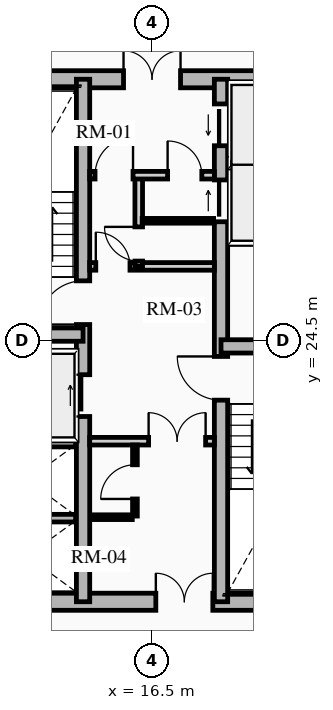
"""IFC4 building model, lengths in metres.
Left out: names, types, materials, properties, quantities, classifications, styles, units other than length and angle.
Written with IfcOpenShell. Run it as: python <this file> out.ifc"""

import sys

from ifc_helpers import new_model, si_unit, direction, frame, frame_2d, origin, place, context, subcontext, project, spatial, rectangle, extrude, source, transform, mapped, element, fill, save


model = new_model("IFC4")
c1 = context("Model", 3, precision=1e-05, world=origin(), true_north=direction((0.0, 1.0)))
c2 = subcontext(c1, "Body", "Model", "MODEL_VIEW")
j1 = project(units=[si_unit("LENGTHUNIT", "METRE"), si_unit("PLANEANGLEUNIT", "RADIAN")], contexts=[c1])
p1 = place(None, origin())
s1 = spatial("IfcSite", under=j1, at=p1, CompositionType="ELEMENT")
p2 = place(p1, origin())
s2 = spatial("IfcBuilding", under=s1, at=p2, CompositionType="ELEMENT")
p3 = place(p2, frame((0.0, 0.0, 75.97)))
s3 = spatial("IfcBuildingStorey", under=s2, at=p3, CompositionType="ELEMENT", Elevation=75.97)
p4 = place(p3, frame((11.15, 17.625, 0.0), z_axis=(0.0, 0.0, 1.0), x_axis=(1.0, 0.0, 0.0)))
e1 = element("IfcWall", 1, at=p4, inside=s3, PredefinedType="SHEAR", context=c2, shape_type="SweptSolid", body=[
    extrude(rectangle(XDim=10.7, YDim=0.45, at=frame_2d((5.35, 0.0))), origin(), (0.0, 0.0, 1.0), 2.91),
])
m1 = source(origin(), c2, "Body", "SweptSolid", [
    extrude(rectangle(XDim=1.5, YDim=2.02, at=frame_2d((0.75, 1.01))), frame((0.0, 0.235, 0.0), z_axis=(0.0, -1.0, 0.0), x_axis=(1.0, 0.0, 0.0)), (0.0, 0.0, 1.0), 0.47),
])
p5 = place(p4, frame((5.45, 0.0, 0.0)))
e2 = element("IfcOpeningElement", 2, at=p5, cuts=e1, PredefinedType="OPENING", context=c2, shape_type="MappedRepresentation", body=[
    mapped(m1, transform((0.0, 0.0, 0.0), x_axis=(1.0, 0.0, 0.0), y_axis=(0.0, 1.0, 0.0), z_axis=(0.0, 0.0, 1.0), scale=1.0)),
])
p6 = place(p3, frame((11.15, 31.375, 0.0), z_axis=(0.0, 0.0, 1.0), x_axis=(1.0, 0.0, 0.0)))
e3 = element("IfcWall", 3, at=p6, inside=s3, PredefinedType="SHEAR", context=c2, shape_type="SweptSolid", body=[
    extrude(rectangle(XDim=10.7, YDim=0.45, at=frame_2d((5.35, 0.0))), origin(), (0.0, 0.0, 1.0), 2.91),
])
p7 = place(p6, frame((4.6, 0.0, 0.0)))
e4 = element("IfcOpeningElement", 4, at=p7, cuts=e3, PredefinedType="OPENING", context=c2, shape_type="MappedRepresentation", body=[
    mapped(m1, transform((0.0, 0.0, 0.0), x_axis=(1.0, 0.0, 0.0), y_axis=(0.0, 1.0, 0.0), z_axis=(0.0, 0.0, 1.0), scale=1.0)),
])
p8 = place(p3, frame((14.685, 17.625, 0.0), z_axis=(0.0, 0.0, 1.0), x_axis=(0.0, 1.0, 0.0)))
e5 = element("IfcWall", 5, at=p8, inside=s3, PredefinedType="SHEAR", context=c2, shape_type="SweptSolid", body=[
    extrude(rectangle(XDim=13.75, YDim=0.35, at=frame_2d((6.875, 0.0))), origin(), (0.0, 0.0, 1.0), 2.91),
])
m2 = source(origin(), c2, "Body", "SweptSolid", [
    extrude(rectangle(XDim=1.1, YDim=2.015, at=frame_2d((0.55, 1.007))), frame((0.0, 0.185, 0.0), z_axis=(0.0, -1.0, 0.0), x_axis=(1.0, 0.0, 0.0)), (0.0, 0.0, 1.0), 0.37),
])
p9 = place(p8, frame((4.875, 0.0, 0.0)))
e6 = element("IfcOpeningElement", 6, at=p9, cuts=e5, PredefinedType="OPENING", context=c2, shape_type="MappedRepresentation", body=[
    mapped(m2, transform((0.0, 0.0, 0.0), x_axis=(1.0, 0.0, 0.0), y_axis=(0.0, 1.0, 0.0), z_axis=(0.0, 0.0, 1.0), scale=1.0)),
])
m3 = source(origin(), c2, "Body", "SweptSolid", [
    extrude(rectangle(XDim=1.15, YDim=2.02, at=frame_2d((0.575, 1.01))), frame((0.0, 0.185, 0.0), z_axis=(0.0, -1.0, 0.0), x_axis=(1.0, 0.0, 0.0)), (0.0, 0.0, 1.0), 0.37),
])
p10 = place(p8, frame((7.295, 0.0, 0.0)))
e7 = element("IfcOpeningElement", 7, at=p10, cuts=e5, PredefinedType="OPENING", context=c2, shape_type="MappedRepresentation", body=[
    mapped(m3, transform((0.0, 0.0, 0.0), x_axis=(1.0, 0.0, 0.0), y_axis=(0.0, 1.0, 0.0), z_axis=(0.0, 0.0, 1.0), scale=1.0)),
])
p11 = place(p3, frame((18.315, 17.625, 0.0), z_axis=(0.0, 0.0, 1.0), x_axis=(0.0, 1.0, 0.0)))
e8 = element("IfcWall", 8, at=p11, inside=s3, PredefinedType="SHEAR", context=c2, shape_type="SweptSolid", body=[
    extrude(rectangle(XDim=13.75, YDim=0.35, at=frame_2d((6.875, 0.0))), origin(), (0.0, 0.0, 1.0), 2.91),
])
p12 = place(p11, frame((10.0, 0.0, 0.0)))
e9 = element("IfcOpeningElement", 9, at=p12, cuts=e8, PredefinedType="OPENING", context=c2, shape_type="MappedRepresentation", body=[
    mapped(m2, transform((0.0, 0.0, 0.0), x_axis=(1.0, 0.0, 0.0), y_axis=(0.0, 1.0, 0.0), z_axis=(0.0, 0.0, 1.0), scale=1.0)),
])
p13 = place(p11, frame((12.0, 0.0, 0.0)))
e10 = element("IfcOpeningElement", 10, at=p13, cuts=e8, PredefinedType="OPENING", context=c2, shape_type="MappedRepresentation", body=[
    mapped(m2, transform((0.0, 0.0, 0.0), x_axis=(1.0, 0.0, 0.0), y_axis=(0.0, 1.0, 0.0), z_axis=(0.0, 0.0, 1.0), scale=1.0)),
])
p14 = place(p11, frame((5.305, 0.0, 0.0)))
e11 = element("IfcOpeningElement", 11, at=p14, cuts=e8, PredefinedType="OPENING", context=c2, shape_type="MappedRepresentation", body=[
    mapped(m3, transform((0.0, 0.0, 0.0), x_axis=(1.0, 0.0, 0.0), y_axis=(0.0, 1.0, 0.0), z_axis=(0.0, 0.0, 1.0), scale=1.0)),
])
for number, where, z_axis, x_axis in (
    (12, (11.4, 24.655, 0.0), (0.0, 0.0, 1.0), (1.0, 0.0, 0.0)),
    (13, (18.315, 24.345, 0.0), (0.0, 0.0, 1.0), (1.0, 0.0, 0.0)),
):
    element("IfcWall", number, at=place(p3, frame(where, z_axis=z_axis, x_axis=x_axis)), inside=s3, PredefinedType="SHEAR", context=c2, shape_type="SweptSolid", body=[
        extrude(rectangle(XDim=3.285, YDim=0.35, at=frame_2d((1.643, 0.0))), origin(), (0.0, 0.0, 1.0), 2.91),
    ])
for number, where, z_axis, x_axis in (
    (14, (11.52, 21.8, 0.0), (0.0, 0.0, 1.0), (1.0, 0.0, 0.0)),
    (15, (11.52, 19.825, 0.0), (0.0, 0.0, 1.0), (1.0, 0.0, 0.0)),
    (16, (18.51, 27.13, 0.0), (0.0, 0.0, 1.0), (1.0, 0.0, 0.0)),
    (17, (18.51, 29.175, 0.0), (0.0, 0.0, 1.0), (1.0, 0.0, 0.0)),
):
    element("IfcWall", number, at=place(p3, frame(where, z_axis=z_axis, x_axis=x_axis)), inside=s3, PredefinedType="SHEAR", context=c2, shape_type="SweptSolid", body=[
        extrude(rectangle(XDim=2.97, YDim=0.2, at=frame_2d((1.485, 0.0))), origin(), (0.0, 0.0, 1.0), 2.91),
    ])
p15 = place(p3, frame((14.86, 21.85, 0.0), z_axis=(0.0, 0.0, 1.0), x_axis=(1.0, 0.0, 0.0)))
e18 = element("IfcWall", 18, at=p15, inside=s3, PredefinedType="PARTITIONING", context=c2, shape_type="SweptSolid", body=[
    extrude(rectangle(XDim=3.28, YDim=0.2, at=frame_2d((1.64, 0.0))), origin(), (0.0, 0.0, 1.0), 2.655),
])
m4 = source(origin(), c2, "Body", "SweptSolid", [
    extrude(rectangle(XDim=1.5, YDim=2.02, at=frame_2d((0.75, 1.01))), frame((0.0, 0.11, 0.0), z_axis=(0.0, -1.0, 0.0), x_axis=(1.0, 0.0, 0.0)), (0.0, 0.0, 1.0), 0.22),
])
p16 = place(p15, frame((1.55, 0.0, 0.0)))
e19 = element("IfcOpeningElement", 19, at=p16, cuts=e18, PredefinedType="OPENING", context=c2, shape_type="MappedRepresentation", body=[
    mapped(m4, transform((0.0, 0.0, 0.0), x_axis=(1.0, 0.0, 0.0), y_axis=(0.0, 1.0, 0.0), z_axis=(0.0, 0.0, 1.0), scale=1.0)),
])
p17 = place(p3, frame((14.86, 26.45, 0.0), z_axis=(0.0, 0.0, 1.0), x_axis=(1.0, 0.0, 0.0)))
e20 = element("IfcWall", 20, at=p17, inside=s3, PredefinedType="PARTITIONING", context=c2, shape_type="SweptSolid", body=[
    extrude(rectangle(XDim=3.28, YDim=0.2, at=frame_2d((1.64, 0.0))), origin(), (0.0, 0.0, 1.0), 2.655),
])
m5 = source(origin(), c2, "Body", "SweptSolid", [
    extrude(rectangle(XDim=0.9, YDim=2.005, at=frame_2d((0.45, 1.002))), frame((0.0, 0.11, 0.0), z_axis=(0.0, -1.0, 0.0), x_axis=(1.0, 0.0, 0.0)), (0.0, 0.0, 1.0), 0.22),
])
p18 = place(p17, frame((0.16, 0.0, 0.0)))
e21 = element("IfcOpeningElement", 21, at=p18, cuts=e20, PredefinedType="OPENING", context=c2, shape_type="MappedRepresentation", body=[
    mapped(m5, transform((0.0, 0.0, 0.0), x_axis=(1.0, 0.0, 0.0), y_axis=(0.0, 1.0, 0.0), z_axis=(0.0, 0.0, 1.0), scale=1.0)),
])
p19 = place(p3, frame((16.15, 26.45, 0.0), z_axis=(0.0, 0.0, 1.0), x_axis=(0.0, 1.0, 0.0)))
e22 = element("IfcWall", 22, at=p19, inside=s3, PredefinedType="PARTITIONING", context=c2, shape_type="SweptSolid", body=[
    extrude(rectangle(XDim=2.4, YDim=0.2, at=frame_2d((1.2, 0.0))), origin(), (0.0, 0.0, 1.0), 2.655),
])
p20 = place(p19, frame((0.14, 0.0, 0.0)))
e23 = element("IfcOpeningElement", 23, at=p20, cuts=e22, PredefinedType="OPENING", context=c2, shape_type="MappedRepresentation", body=[
    mapped(m5, transform((0.0, 0.0, 0.0), x_axis=(1.0, 0.0, 0.0), y_axis=(0.0, 1.0, 0.0), z_axis=(0.0, 0.0, 1.0), scale=1.0)),
])
p21 = place(p3, frame((14.86, 28.85, 0.0), z_axis=(0.0, 0.0, 1.0), x_axis=(1.0, 0.0, 0.0)))
e24 = element("IfcWall", 24, at=p21, inside=s3, PredefinedType="PARTITIONING", context=c2, shape_type="SweptSolid", body=[
    extrude(rectangle(XDim=3.28, YDim=0.2, at=frame_2d((1.64, 0.0))), origin(), (0.0, 0.0, 1.0), 2.655),
])
m6 = source(origin(), c2, "Body", "SweptSolid", [
    extrude(rectangle(XDim=1.0, YDim=2.015, at=frame_2d((0.5, 1.007))), frame((0.0, 0.11, 0.0), z_axis=(0.0, -1.0, 0.0), x_axis=(1.0, 0.0, 0.0)), (0.0, 0.0, 1.0), 0.22),
])
p22 = place(p21, frame((0.14, 0.0, 0.0)))
e25 = element("IfcOpeningElement", 25, at=p22, cuts=e24, PredefinedType="OPENING", context=c2, shape_type="MappedRepresentation", body=[
    mapped(m6, transform((0.0, 0.0, 0.0), x_axis=(1.0, 0.0, 0.0), y_axis=(0.0, 1.0, 0.0), z_axis=(0.0, 0.0, 1.0), scale=1.0)),
])
p23 = place(p21, frame((2.05, 0.0, 0.0)))
e26 = element("IfcOpeningElement", 26, at=p23, cuts=e24, PredefinedType="OPENING", context=c2, shape_type="MappedRepresentation", body=[
    mapped(m5, transform((0.0, 0.0, 0.0), x_axis=(1.0, 0.0, 0.0), y_axis=(0.0, 1.0, 0.0), z_axis=(0.0, 0.0, 1.0), scale=1.0)),
])
p24 = place(p3, frame((16.05, 19.88, 0.0), z_axis=(0.0, 0.0, 1.0), x_axis=(0.0, 1.0, 0.0)))
e27 = element("IfcWall", 27, at=p24, inside=s3, PredefinedType="PARTITIONING", context=c2, shape_type="SweptSolid", body=[
    extrude(rectangle(XDim=1.87, YDim=0.125, at=frame_2d((0.935, 0.0))), origin(), (0.0, 0.0, 1.0), 2.655),
])
m7 = source(origin(), c2, "Body", "SweptSolid", [
    extrude(rectangle(XDim=0.9, YDim=2.005, at=frame_2d((0.45, 1.002))), frame((0.0, 0.073, 0.0), z_axis=(0.0, -1.0, 0.0), x_axis=(1.0, 0.0, 0.0)), (0.0, 0.0, 1.0), 0.145),
])
p25 = place(p24, frame((0.45, 0.0, 0.0)))
e28 = element("IfcOpeningElement", 28, at=p25, cuts=e27, PredefinedType="OPENING", context=c2, shape_type="MappedRepresentation", body=[
    mapped(m7, transform((0.0, 0.0, 0.0), x_axis=(1.0, 0.0, 0.0), y_axis=(0.0, 1.0, 0.0), z_axis=(0.0, 0.0, 1.0), scale=1.0)),
])
p26 = place(p3, frame((14.88, 19.85, 0.0), z_axis=(0.0, 0.0, 1.0), x_axis=(1.0, 0.0, 0.0)))
e29 = element("IfcWall", 29, at=p26, inside=s3, PredefinedType="PARTITIONING", context=c2, shape_type="SweptSolid", body=[
    extrude(rectangle(XDim=1.1, YDim=0.125, at=frame_2d((0.55, 0.0))), origin(), (0.0, 0.0, 1.0), 2.655),
])
p27 = place(p3, frame((16.24, 27.65, 0.0), z_axis=(0.0, 0.0, 1.0), x_axis=(1.0, 0.0, 0.0)))
e30 = element("IfcWall", 30, at=p27, inside=s3, PredefinedType="PARTITIONING", context=c2, shape_type="SweptSolid", body=[
    extrude(rectangle(XDim=1.88, YDim=0.125, at=frame_2d((0.94, 0.0))), origin(), (0.0, 0.0, 1.0), 2.655),
])
m8 = source(origin(), c2, "Body", "SweptSolid", [
    extrude(rectangle(XDim=1.1, YDim=2.015, at=frame_2d((0.55, 1.007))), frame((0.0, 0.025, 0.0), z_axis=(0.0, -1.0, 0.0), x_axis=(1.0, 0.0, 0.0)), (0.0, 0.0, 1.0), 0.05),
])
p28 = place(p9, origin())
e31 = element("IfcDoor", 31, at=p28, inside=s3, OperationType="SLIDING_TO_RIGHT", PredefinedType="DOOR", context=c2, shape_type="MappedRepresentation", body=[
    mapped(m8, transform((0.0, 0.0, 0.0), x_axis=(1.0, 0.0, 0.0), y_axis=(0.0, 1.0, 0.0), z_axis=(0.0, 0.0, 1.0), scale=1.0)),
])
fill(e6, e31)
p29 = place(p12, origin())
e32 = element("IfcDoor", 32, at=p29, inside=s3, OperationType="SLIDING_TO_RIGHT", PredefinedType="DOOR", context=c2, shape_type="MappedRepresentation", body=[
    mapped(m8, transform((0.0, 0.0, 0.0), x_axis=(1.0, 0.0, 0.0), y_axis=(0.0, 1.0, 0.0), z_axis=(0.0, 0.0, 1.0), scale=1.0)),
])
fill(e9, e32)
p30 = place(p13, origin())
e33 = element("IfcDoor", 33, at=p30, inside=s3, OperationType="SLIDING_TO_LEFT", PredefinedType="DOOR", context=c2, shape_type="MappedRepresentation", body=[
    mapped(m8, transform((0.0, 0.0, 0.0), x_axis=(1.0, 0.0, 0.0), y_axis=(0.0, 1.0, 0.0), z_axis=(0.0, 0.0, 1.0), scale=1.0)),
])
fill(e10, e33)
m9 = source(origin(), c2, "Body", "SweptSolid", [
    extrude(rectangle(XDim=1.15, YDim=2.02, at=frame_2d((0.575, 1.01))), frame((0.0, 0.025, 0.0), z_axis=(0.0, -1.0, 0.0), x_axis=(1.0, 0.0, 0.0)), (0.0, 0.0, 1.0), 0.05),
])
p31 = place(p10, origin())
e34 = element("IfcDoor", 34, at=p31, inside=s3, OperationType="SINGLE_SWING_LEFT", PredefinedType="DOOR", context=c2, shape_type="MappedRepresentation", body=[
    mapped(m9, transform((0.0, 0.0, 0.0), x_axis=(1.0, 0.0, 0.0), y_axis=(0.0, 1.0, 0.0), z_axis=(0.0, 0.0, 1.0), scale=1.0)),
])
fill(e7, e34)
p32 = place(p14, origin())
e35 = element("IfcDoor", 35, at=p32, inside=s3, OperationType="SINGLE_SWING_RIGHT", PredefinedType="DOOR", context=c2, shape_type="MappedRepresentation", body=[
    mapped(m9, transform((0.0, 0.0, 0.0), x_axis=(1.0, 0.0, 0.0), y_axis=(0.0, 1.0, 0.0), z_axis=(0.0, 0.0, 1.0), scale=1.0)),
])
fill(e11, e35)
m10 = source(origin(), c2, "Body", "SweptSolid", [
    extrude(rectangle(XDim=1.5, YDim=2.02, at=frame_2d((0.75, 1.01))), frame((0.0, 0.025, 0.0), z_axis=(0.0, -1.0, 0.0), x_axis=(1.0, 0.0, 0.0)), (0.0, 0.0, 1.0), 0.05),
])
p33 = place(p7, origin())
e36 = element("IfcDoor", 36, at=p33, inside=s3, OperationType="DOUBLE_DOOR_SINGLE_SWING", PredefinedType="DOOR", context=c2, shape_type="MappedRepresentation", body=[
    mapped(m10, transform((0.0, 0.0, 0.0), x_axis=(1.0, 0.0, 0.0), y_axis=(0.0, 1.0, 0.0), z_axis=(0.0, 0.0, 1.0), scale=1.0)),
])
fill(e4, e36)
p34 = place(p5, origin())
e37 = element("IfcDoor", 37, at=p34, inside=s3, OperationType="DOUBLE_DOOR_SINGLE_SWING", PredefinedType="DOOR", context=c2, shape_type="MappedRepresentation", body=[
    mapped(m10, transform((0.0, 0.0, 0.0), x_axis=(1.0, 0.0, 0.0), y_axis=(0.0, 1.0, 0.0), z_axis=(0.0, 0.0, 1.0), scale=1.0)),
])
fill(e2, e37)
p35 = place(p16, origin())
e38 = element("IfcDoor", 38, at=p35, inside=s3, OperationType="DOUBLE_DOOR_SINGLE_SWING", PredefinedType="DOOR", context=c2, shape_type="MappedRepresentation", body=[
    mapped(m10, transform((0.0, 0.0, 0.0), x_axis=(1.0, 0.0, 0.0), y_axis=(0.0, 1.0, 0.0), z_axis=(0.0, 0.0, 1.0), scale=1.0)),
])
fill(e19, e38)
m11 = source(origin(), c2, "Body", "SweptSolid", [
    extrude(rectangle(XDim=0.9, YDim=2.005, at=frame_2d((0.45, 1.002))), frame((0.0, 0.025, 0.0), z_axis=(0.0, -1.0, 0.0), x_axis=(1.0, 0.0, 0.0)), (0.0, 0.0, 1.0), 0.05),
])
p36 = place(p18, origin())
e39 = element("IfcDoor", 39, at=p36, inside=s3, OperationType="SINGLE_SWING_LEFT", PredefinedType="DOOR", context=c2, shape_type="MappedRepresentation", body=[
    mapped(m11, transform((0.0, 0.0, 0.0), x_axis=(1.0, 0.0, 0.0), y_axis=(0.0, 1.0, 0.0), z_axis=(0.0, 0.0, 1.0), scale=1.0)),
])
fill(e21, e39)
m12 = source(origin(), c2, "Body", "SweptSolid", [
    extrude(rectangle(XDim=1.0, YDim=2.015, at=frame_2d((0.5, 1.007))), frame((0.0, 0.025, 0.0), z_axis=(0.0, -1.0, 0.0), x_axis=(1.0, 0.0, 0.0)), (0.0, 0.0, 1.0), 0.05),
])
p37 = place(p22, origin())
e40 = element("IfcDoor", 40, at=p37, inside=s3, OperationType="SINGLE_SWING_RIGHT", PredefinedType="DOOR", context=c2, shape_type="MappedRepresentation", body=[
    mapped(m12, transform((0.0, 0.0, 0.0), x_axis=(1.0, 0.0, 0.0), y_axis=(0.0, 1.0, 0.0), z_axis=(0.0, 0.0, 1.0), scale=1.0)),
])
fill(e25, e40)
p38 = place(p25, origin())
e41 = element("IfcDoor", 41, at=p38, inside=s3, OperationType="SINGLE_SWING_LEFT", PredefinedType="DOOR", context=c2, shape_type="MappedRepresentation", body=[
    mapped(m11, transform((0.0, 0.0, 0.0), x_axis=(1.0, 0.0, 0.0), y_axis=(0.0, 1.0, 0.0), z_axis=(0.0, 0.0, 1.0), scale=1.0)),
])
fill(e28, e41)
p39 = place(p20, origin())
e42 = element("IfcDoor", 42, at=p39, inside=s3, OperationType="SINGLE_SWING_RIGHT", PredefinedType="DOOR", context=c2, shape_type="MappedRepresentation", body=[
    mapped(m11, transform((0.0, 0.0, 0.0), x_axis=(1.0, 0.0, 0.0), y_axis=(0.0, 1.0, 0.0), z_axis=(0.0, 0.0, 1.0), scale=1.0)),
])
fill(e23, e42)
p40 = place(p23, origin())
e43 = element("IfcDoor", 43, at=p40, inside=s3, OperationType="SINGLE_SWING_LEFT", PredefinedType="DOOR", context=c2, shape_type="MappedRepresentation", body=[
    mapped(m11, transform((0.0, 0.0, 0.0), x_axis=(1.0, 0.0, 0.0), y_axis=(0.0, 1.0, 0.0), z_axis=(0.0, 0.0, 1.0), scale=1.0)),
])
fill(e26, e43)
save(model, sys.argv[1])
